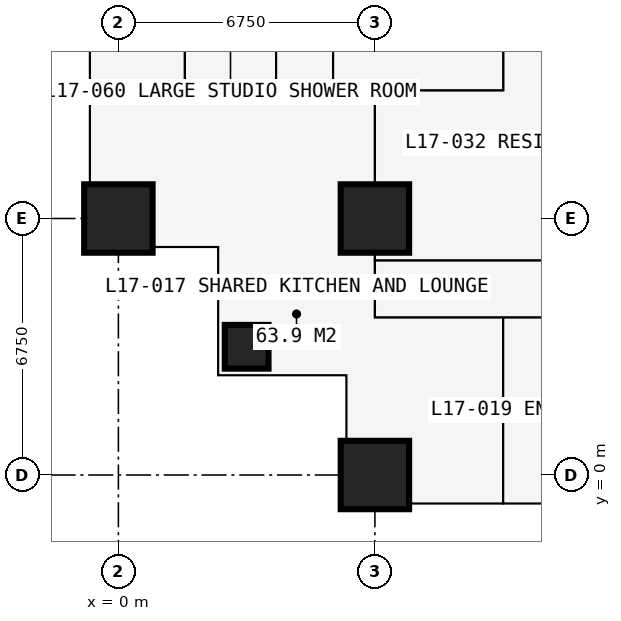
"""IFC4 building model, lengths in metres.
Left out: names, types, materials, properties, quantities, classifications, styles, units other than length and angle.
Written with IfcOpenShell. Run it as: python <this file> out.ifc"""

import sys

from ifc_helpers import new_model, si_unit, direction, frame, frame_2d, origin, origin_2d, place, context, subcontext, project, spatial, rectangle, extrude, element, fill, save


model = new_model("IFC4")
c1 = context("Model", 3, precision=1e-05, world=origin(), true_north=direction((0.0, 1.0)))
c2 = subcontext(c1, "Body", "Model", "MODEL_VIEW")
j1 = project(units=[si_unit("LENGTHUNIT", "METRE"), si_unit("PLANEANGLEUNIT", "RADIAN")], contexts=[c1])
p1 = place(None, origin())
s1 = spatial("IfcSite", under=j1, at=p1, CompositionType="ELEMENT")
p2 = place(p1, origin())
s2 = spatial("IfcBuilding", under=s1, at=p2, CompositionType="ELEMENT")
p3 = place(p2, frame((0.0, 0.0, 64.8)))
s3 = spatial("IfcBuildingStorey", under=s2, at=p3, CompositionType="ELEMENT", Elevation=64.8)
p4 = place(p3, frame((0.0, 6.75, 0.0), z_axis=(0.0, 0.0, 1.0), x_axis=(1.0, 0.0, 0.0)))
e1 = element("IfcColumn", 1, at=p4, inside=s3, PredefinedType="COLUMN", context=c2, shape_type="SweptSolid", body=[
    extrude(rectangle(XDim=1.8, YDim=1.8, at=origin_2d()), origin(), (0.0, 0.0, 1.0), 3.6),
])
p5 = place(p3, frame((3.375, 3.375, 0.0), z_axis=(0.0, 0.0, 1.0), x_axis=(1.0, 0.0, 0.0)))
e2 = element("IfcColumn", 2, at=p5, inside=s3, PredefinedType="COLUMN", context=c2, shape_type="SweptSolid", body=[
    extrude(rectangle(XDim=1.15, YDim=1.15, at=origin_2d()), origin(), (0.0, 0.0, 1.0), 3.6),
])
for number, where, z_axis, x_axis in (
    (3, (6.75, 0.0, 0.0), (0.0, 0.0, 1.0), (1.0, 0.0, 0.0)),
    (4, (6.75, 6.75, 0.0), (0.0, 0.0, 1.0), (1.0, 0.0, 0.0)),
):
    element("IfcColumn", number, at=place(p3, frame(where, z_axis=z_axis, x_axis=x_axis)), inside=s3, PredefinedType="COLUMN", context=c2, shape_type="SweptSolid", body=[
        extrude(rectangle(XDim=1.8, YDim=1.8, at=origin_2d()), origin(), (0.0, 0.0, 1.0), 3.6),
    ])
p6 = place(p3, frame((-0.75, 6.0, 0.0), z_axis=(0.0, 0.0, 1.0), x_axis=(1.0, 0.0, 0.0)))
e5 = element("IfcWall", 5, at=p6, inside=s3, PredefinedType="SOLIDWALL", context=c2, shape_type="SweptSolid", body=[
    extrude(rectangle(XDim=3.375, YDim=0.3, at=frame_2d((1.688, 0.0))), origin(), (0.0, 0.0, 1.0), 3.375),
])
p7 = place(p6, frame((1.833, 0.0, 0.9)))
e6 = element("IfcOpeningElement", 6, at=p7, cuts=e5, PredefinedType="OPENING", context=c2, shape_type="SweptSolid", body=[
    extrude(rectangle(XDim=1.2, YDim=1.8, at=frame_2d((0.6, 0.9))), frame((0.0, 0.16, 0.0), z_axis=(0.0, -1.0, 0.0), x_axis=(1.0, 0.0, 0.0)), (0.0, 0.0, 1.0), 0.32),
])
p8 = place(p3, frame((2.625, 6.0, 0.0), z_axis=(0.0, 0.0, 1.0), x_axis=(0.0, -1.0, 0.0)))
e7 = element("IfcWall", 7, at=p8, inside=s3, PredefinedType="SOLIDWALL", context=c2, shape_type="SweptSolid", body=[
    extrude(rectangle(XDim=3.375, YDim=0.3, at=frame_2d((1.688, 0.0))), origin(), (0.0, 0.0, 1.0), 3.375),
])
p9 = place(p8, frame((0.788, 0.0, 0.6)))
e8 = element("IfcOpeningElement", 8, at=p9, cuts=e7, PredefinedType="OPENING", context=c2, shape_type="SweptSolid", body=[
    extrude(rectangle(XDim=1.8, YDim=2.1, at=frame_2d((0.9, 1.05))), frame((0.0, 0.16, 0.0), z_axis=(0.0, -1.0, 0.0), x_axis=(1.0, 0.0, 0.0)), (0.0, 0.0, 1.0), 0.32),
])
p10 = place(p3, frame((2.625, 2.625, 0.0), z_axis=(0.0, 0.0, 1.0), x_axis=(1.0, 0.0, 0.0)))
e9 = element("IfcWall", 9, at=p10, inside=s3, PredefinedType="SOLIDWALL", context=c2, shape_type="SweptSolid", body=[
    extrude(rectangle(XDim=3.375, YDim=0.3, at=frame_2d((1.688, 0.0))), origin(), (0.0, 0.0, 1.0), 3.375),
])
p11 = place(p10, frame((0.788, 0.0, 0.6)))
e10 = element("IfcOpeningElement", 10, at=p11, cuts=e9, PredefinedType="OPENING", context=c2, shape_type="SweptSolid", body=[
    extrude(rectangle(XDim=1.8, YDim=2.1, at=frame_2d((0.9, 1.05))), frame((0.0, 0.16, 0.0), z_axis=(0.0, -1.0, 0.0), x_axis=(1.0, 0.0, 0.0)), (0.0, 0.0, 1.0), 0.32),
])
p12 = place(p3, frame((6.0, 2.625, 0.0), z_axis=(0.0, 0.0, 1.0), x_axis=(0.0, -1.0, 0.0)))
e11 = element("IfcWall", 11, at=p12, inside=s3, PredefinedType="SOLIDWALL", context=c2, shape_type="SweptSolid", body=[
    extrude(rectangle(XDim=3.375, YDim=0.3, at=frame_2d((1.688, 0.0))), origin(), (0.0, 0.0, 1.0), 3.375),
])
p13 = place(p12, frame((0.343, 0.0, 0.9)))
e12 = element("IfcOpeningElement", 12, at=p13, cuts=e11, PredefinedType="OPENING", context=c2, shape_type="SweptSolid", body=[
    extrude(rectangle(XDim=1.2, YDim=1.8, at=frame_2d((0.6, 0.9))), frame((0.0, 0.16, 0.0), z_axis=(0.0, -1.0, 0.0), x_axis=(1.0, 0.0, 0.0)), (0.0, 0.0, 1.0), 0.32),
])
p14 = place(p3, frame((-0.734, 10.125, 0.0), z_axis=(0.0, 0.0, 1.0), x_axis=(1.0, 0.0, 0.0)))
e13 = element("IfcWall", 13, at=p14, inside=s3, PredefinedType="PARTITIONING", context=c2, shape_type="SweptSolid", body=[
    extrude(rectangle(XDim=10.859, YDim=0.15, at=frame_2d((5.429, 0.0))), origin(), (0.0, 0.0, 1.0), 3.375),
])
p15 = place(p3, frame((1.75, 10.125, 0.0), z_axis=(0.0, 0.0, 1.0), x_axis=(0.0, 1.0, 0.0)))
e14 = element("IfcWall", 14, at=p15, inside=s3, PredefinedType="PARTITIONING", context=c2, shape_type="SweptSolid", body=[
    extrude(rectangle(XDim=2.6, YDim=0.1, at=frame_2d((1.3, 0.0))), origin(), (0.0, 0.0, 1.0), 3.375),
])
p16 = place(p15, frame((0.85, 0.0, 0.0)))
e15 = element("IfcOpeningElement", 15, at=p16, cuts=e14, PredefinedType="OPENING", context=c2, shape_type="SweptSolid", body=[
    extrude(rectangle(XDim=0.9, YDim=2.2, at=frame_2d((0.45, 1.1))), frame((0.0, 0.06, 0.0), z_axis=(0.0, -1.0, 0.0), x_axis=(1.0, 0.0, 0.0)), (0.0, 0.0, 1.0), 0.12),
])
p17 = place(p3, frame((4.15, 10.125, 0.0), z_axis=(0.0, 0.0, 1.0), x_axis=(0.0, 1.0, 0.0)))
e16 = element("IfcWall", 16, at=p17, inside=s3, PredefinedType="PARTITIONING", context=c2, shape_type="SweptSolid", body=[
    extrude(rectangle(XDim=23.625, YDim=0.15, at=frame_2d((11.812, 0.0))), origin(), (0.0, 0.0, 1.0), 3.375),
])
p18 = place(p17, frame((4.2, 0.0, 0.0)))
e17 = element("IfcOpeningElement", 17, at=p18, cuts=e16, PredefinedType="OPENING", context=c2, shape_type="SweptSolid", body=[
    extrude(rectangle(XDim=0.95, YDim=2.2, at=frame_2d((0.475, 1.1))), frame((0.0, 0.085, 0.0), z_axis=(0.0, -1.0, 0.0), x_axis=(1.0, 0.0, 0.0)), (0.0, 0.0, 1.0), 0.17),
])
p19 = place(p17, frame((10.95, 0.0, 0.0)))
e18 = element("IfcOpeningElement", 18, at=p19, cuts=e16, PredefinedType="OPENING", context=c2, shape_type="SweptSolid", body=[
    extrude(rectangle(XDim=0.95, YDim=2.2, at=frame_2d((0.475, 1.1))), frame((0.0, 0.085, 0.0), z_axis=(0.0, -1.0, 0.0), x_axis=(1.0, 0.0, 0.0)), (0.0, 0.0, 1.0), 0.17),
])
p20 = place(p17, frame((17.7, 0.0, 0.0)))
e19 = element("IfcOpeningElement", 19, at=p20, cuts=e16, PredefinedType="OPENING", context=c2, shape_type="SweptSolid", body=[
    extrude(rectangle(XDim=0.95, YDim=2.2, at=frame_2d((0.475, 1.1))), frame((0.0, 0.085, 0.0), z_axis=(0.0, -1.0, 0.0), x_axis=(1.0, 0.0, 0.0)), (0.0, 0.0, 1.0), 0.17),
])
p21 = place(p3, frame((5.65, 10.125, 0.0), z_axis=(0.0, 0.0, 1.0), x_axis=(0.0, 1.0, 0.0)))
e20 = element("IfcWall", 20, at=p21, inside=s3, PredefinedType="PARTITIONING", context=c2, shape_type="SweptSolid", body=[
    extrude(rectangle(XDim=10.762, YDim=0.15, at=frame_2d((5.381, 0.0))), origin(), (0.0, 0.0, 1.0), 3.375),
])
p22 = place(p21, frame((4.9, 0.0, 0.0)))
e21 = element("IfcOpeningElement", 21, at=p22, cuts=e20, PredefinedType="OPENING", context=c2, shape_type="SweptSolid", body=[
    extrude(rectangle(XDim=0.95, YDim=2.2, at=frame_2d((0.475, 1.1))), frame((0.0, 0.085, 0.0), z_axis=(0.0, -1.0, 0.0), x_axis=(1.0, 0.0, 0.0)), (0.0, 0.0, 1.0), 0.17),
])
p23 = place(p3, frame((6.75, 4.15, 0.0), z_axis=(0.0, 0.0, 1.0), x_axis=(0.0, 1.0, 0.0)))
e22 = element("IfcWall", 22, at=p23, inside=s3, PredefinedType="PARTITIONING", context=c2, shape_type="SweptSolid", body=[
    extrude(rectangle(XDim=5.975, YDim=0.15, at=frame_2d((2.988, 0.0))), origin(), (0.0, 0.0, 1.0), 2.877),
])
p24 = place(p3, frame((6.75, 4.15, 0.0), z_axis=(0.0, 0.0, 1.0), x_axis=(1.0, 0.0, 0.0)))
e23 = element("IfcWall", 23, at=p24, inside=s3, PredefinedType="PARTITIONING", context=c2, shape_type="SweptSolid", body=[
    extrude(rectangle(XDim=23.625, YDim=0.1, at=frame_2d((11.812, 0.0))), origin(), (0.0, 0.0, 1.0), 3.375),
])
p25 = place(p24, frame((1.2, 0.0, 0.0)))
e24 = element("IfcOpeningElement", 24, at=p25, cuts=e23, PredefinedType="OPENING", context=c2, shape_type="SweptSolid", body=[
    extrude(rectangle(XDim=1.0, YDim=2.2, at=frame_2d((0.5, 1.1))), frame((0.0, 0.06, 0.0), z_axis=(0.0, -1.0, 0.0), x_axis=(1.0, 0.0, 0.0)), (0.0, 0.0, 1.0), 0.12),
])
p26 = place(p24, frame((3.575, 0.0, 0.0)))
e25 = element("IfcOpeningElement", 25, at=p26, cuts=e23, PredefinedType="OPENING", context=c2, shape_type="SweptSolid", body=[
    extrude(rectangle(XDim=0.95, YDim=2.2, at=frame_2d((0.475, 1.1))), frame((0.0, 0.06, 0.0), z_axis=(0.0, -1.0, 0.0), x_axis=(1.0, 0.0, 0.0)), (0.0, 0.0, 1.0), 0.12),
])
p27 = place(p24, frame((7.0, 0.0, 0.0)))
e26 = element("IfcOpeningElement", 26, at=p27, cuts=e23, PredefinedType="OPENING", context=c2, shape_type="SweptSolid", body=[
    extrude(rectangle(XDim=0.95, YDim=2.2, at=frame_2d((0.475, 1.1))), frame((0.0, 0.06, 0.0), z_axis=(0.0, -1.0, 0.0), x_axis=(1.0, 0.0, 0.0)), (0.0, 0.0, 1.0), 0.12),
])
p28 = place(p24, frame((10.375, 0.0, 0.0)))
e27 = element("IfcOpeningElement", 27, at=p28, cuts=e23, PredefinedType="OPENING", context=c2, shape_type="SweptSolid", body=[
    extrude(rectangle(XDim=0.95, YDim=2.2, at=frame_2d((0.475, 1.1))), frame((0.0, 0.06, 0.0), z_axis=(0.0, -1.0, 0.0), x_axis=(1.0, 0.0, 0.0)), (0.0, 0.0, 1.0), 0.12),
])
p29 = place(p24, frame((13.7, 0.0, 0.0)))
e28 = element("IfcOpeningElement", 28, at=p29, cuts=e23, PredefinedType="OPENING", context=c2, shape_type="SweptSolid", body=[
    extrude(rectangle(XDim=0.95, YDim=2.2, at=frame_2d((0.475, 1.1))), frame((0.0, 0.06, 0.0), z_axis=(0.0, -1.0, 0.0), x_axis=(1.0, 0.0, 0.0)), (0.0, 0.0, 1.0), 0.12),
])
p30 = place(p24, frame((17.125, 0.0, 0.0)))
e29 = element("IfcOpeningElement", 29, at=p30, cuts=e23, PredefinedType="OPENING", context=c2, shape_type="SweptSolid", body=[
    extrude(rectangle(XDim=0.95, YDim=2.2, at=frame_2d((0.475, 1.1))), frame((0.0, 0.06, 0.0), z_axis=(0.0, -1.0, 0.0), x_axis=(1.0, 0.0, 0.0)), (0.0, 0.0, 1.0), 0.12),
])
p31 = place(p24, frame((20.5, 0.0, 0.0)))
e30 = element("IfcOpeningElement", 30, at=p31, cuts=e23, PredefinedType="OPENING", context=c2, shape_type="SweptSolid", body=[
    extrude(rectangle(XDim=0.95, YDim=2.2, at=frame_2d((0.475, 1.1))), frame((0.0, 0.06, 0.0), z_axis=(0.0, -1.0, 0.0), x_axis=(1.0, 0.0, 0.0)), (0.0, 0.0, 1.0), 0.12),
])
p32 = place(p3, frame((6.75, 5.65, 0.0), z_axis=(0.0, 0.0, 1.0), x_axis=(1.0, 0.0, 0.0)))
e31 = element("IfcWall", 31, at=p32, inside=s3, PredefinedType="PARTITIONING", context=c2, shape_type="SweptSolid", body=[
    extrude(rectangle(XDim=11.05, YDim=0.15, at=frame_2d((5.525, 0.0))), origin(), (0.0, 0.0, 1.0), 3.375),
])
p33 = place(p3, frame((10.125, -0.734, 0.0), z_axis=(0.0, 0.0, 1.0), x_axis=(0.0, 1.0, 0.0)))
e32 = element("IfcWall", 32, at=p33, inside=s3, PredefinedType="PARTITIONING", context=c2, shape_type="SweptSolid", body=[
    extrude(rectangle(XDim=4.884, YDim=0.15, at=frame_2d((2.442, 0.0))), origin(), (0.0, 0.0, 1.0), 3.375),
])
p34 = place(p3, frame((10.125, 10.125, 0.0), z_axis=(0.0, 0.0, 1.0), x_axis=(0.0, 1.0, 0.0)))
e33 = element("IfcWall", 33, at=p34, inside=s3, PredefinedType="PARTITIONING", context=c2, shape_type="SweptSolid", body=[
    extrude(rectangle(XDim=1.175, YDim=0.15, at=frame_2d((0.587, 0.0))), origin(), (0.0, 0.0, 1.0), 3.375),
])
p35 = place(p7, origin())
e34 = element("IfcWindow", 34, at=p35, inside=s3, PartitioningType="SINGLE_PANEL", PredefinedType="WINDOW", context=c2, shape_type="SweptSolid", body=[
    extrude(rectangle(XDim=1.2, YDim=1.8, at=frame_2d((0.6, 0.9))), frame((0.0, 0.03, 0.0), z_axis=(0.0, -1.0, 0.0), x_axis=(1.0, 0.0, 0.0)), (0.0, 0.0, 1.0), 0.06),
])
fill(e6, e34)
p36 = place(p9, origin())
e35 = element("IfcWindow", 35, at=p36, inside=s3, PartitioningType="SINGLE_PANEL", PredefinedType="WINDOW", context=c2, shape_type="SweptSolid", body=[
    extrude(rectangle(XDim=1.8, YDim=2.1, at=frame_2d((0.9, 1.05))), frame((0.0, 0.03, 0.0), z_axis=(0.0, -1.0, 0.0), x_axis=(1.0, 0.0, 0.0)), (0.0, 0.0, 1.0), 0.06),
])
fill(e8, e35)
p37 = place(p11, origin())
e36 = element("IfcWindow", 36, at=p37, inside=s3, PartitioningType="SINGLE_PANEL", PredefinedType="WINDOW", context=c2, shape_type="SweptSolid", body=[
    extrude(rectangle(XDim=1.8, YDim=2.1, at=frame_2d((0.9, 1.05))), frame((0.0, 0.03, 0.0), z_axis=(0.0, -1.0, 0.0), x_axis=(1.0, 0.0, 0.0)), (0.0, 0.0, 1.0), 0.06),
])
fill(e10, e36)
p38 = place(p13, origin())
e37 = element("IfcWindow", 37, at=p38, inside=s3, PartitioningType="SINGLE_PANEL", PredefinedType="WINDOW", context=c2, shape_type="SweptSolid", body=[
    extrude(rectangle(XDim=1.2, YDim=1.8, at=frame_2d((0.6, 0.9))), frame((0.0, 0.03, 0.0), z_axis=(0.0, -1.0, 0.0), x_axis=(1.0, 0.0, 0.0)), (0.0, 0.0, 1.0), 0.06),
])
fill(e12, e37)
p39 = place(p25, origin())
e38 = element("IfcDoor", 38, at=p39, inside=s3, OperationType="SINGLE_SWING_LEFT", PredefinedType="DOOR", context=c2, shape_type="SweptSolid", body=[
    extrude(rectangle(XDim=1.0, YDim=2.2, at=frame_2d((0.5, 1.1))), frame((0.0, 0.025, 0.0), z_axis=(0.0, -1.0, 0.0), x_axis=(1.0, 0.0, 0.0)), (0.0, 0.0, 1.0), 0.05),
])
fill(e24, e38)
p40 = place(p26, origin())
e39 = element("IfcDoor", 39, at=p40, inside=s3, OperationType="SINGLE_SWING_LEFT", PredefinedType="DOOR", context=c2, shape_type="SweptSolid", body=[
    extrude(rectangle(XDim=0.95, YDim=2.2, at=frame_2d((0.475, 1.1))), frame((0.0, 0.025, 0.0), z_axis=(0.0, -1.0, 0.0), x_axis=(1.0, 0.0, 0.0)), (0.0, 0.0, 1.0), 0.05),
])
fill(e25, e39)
p41 = place(p16, origin())
e40 = element("IfcDoor", 40, at=p41, inside=s3, OperationType="SINGLE_SWING_RIGHT", PredefinedType="DOOR", context=c2, shape_type="SweptSolid", body=[
    extrude(rectangle(XDim=0.9, YDim=2.2, at=frame_2d((0.45, 1.1))), frame((0.0, 0.025, 0.0), z_axis=(0.0, -1.0, 0.0), x_axis=(1.0, 0.0, 0.0)), (0.0, 0.0, 1.0), 0.05),
])
fill(e15, e40)
save(model, sys.argv[1])
